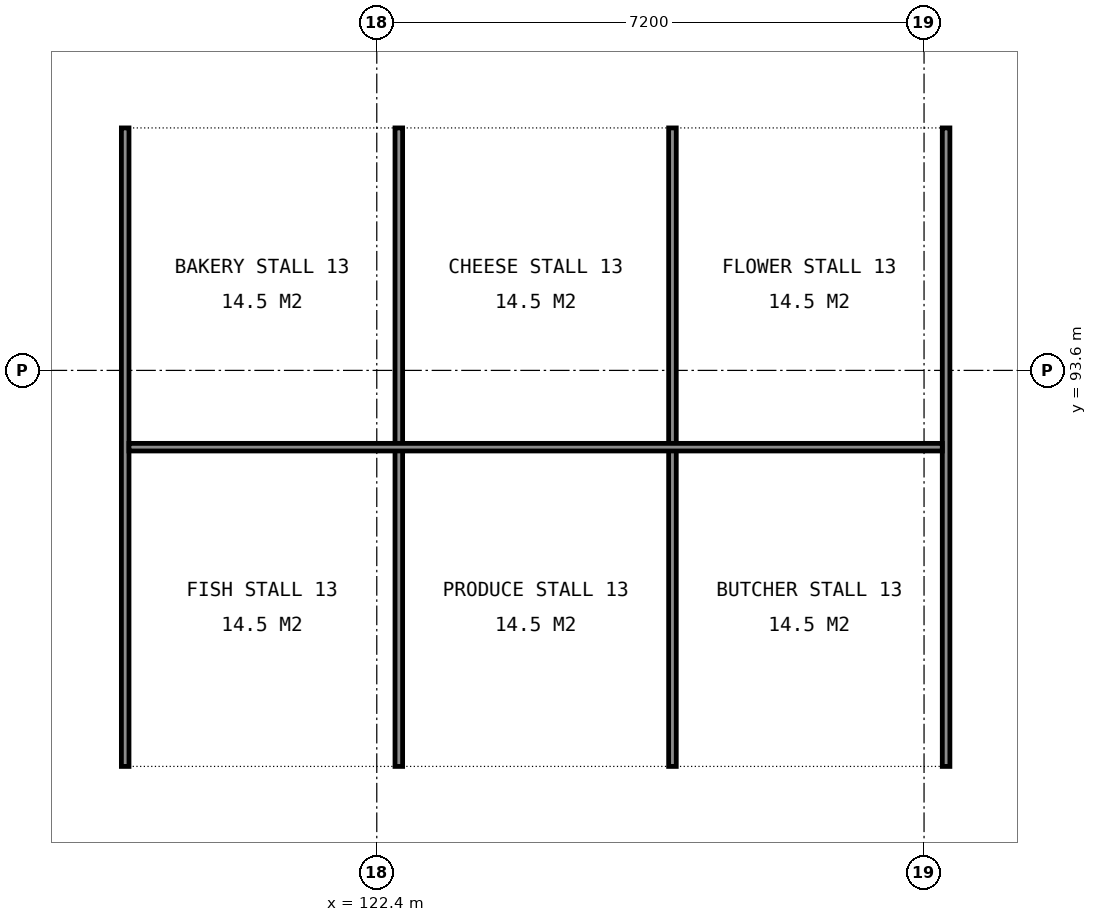
"""IFC4 building model, lengths in metres.
Left out: names, types, materials, properties, quantities, classifications, styles, units other than length and angle.
Written with IfcOpenShell. Run it as: python <this file> out.ifc"""

import sys

from ifc_helpers import new_model, si_unit, direction, frame, frame_2d, origin, place, context, subcontext, project, spatial, rectangle, extrude, element, save


model = new_model("IFC4")
c1 = context("Model", 3, precision=1e-05, world=origin(), true_north=direction((0.0, 1.0)))
c2 = subcontext(c1, "Body", "Model", "MODEL_VIEW")
j1 = project(units=[si_unit("LENGTHUNIT", "METRE"), si_unit("PLANEANGLEUNIT", "RADIAN")], contexts=[c1])
p1 = place(None, origin())
s1 = spatial("IfcSite", under=j1, at=p1, CompositionType="ELEMENT")
p2 = place(p1, origin())
s2 = spatial("IfcBuilding", under=s1, at=p2, CompositionType="ELEMENT")
p3 = place(p2, origin())
s3 = spatial("IfcBuildingStorey", under=s2, at=p3, CompositionType="ELEMENT", Elevation=0.0)
for number, where, z_axis, x_axis in (
    (1, (119.09, 88.39, 0.0), (0.0, 0.0, 1.0), (0.0, 1.0, 0.0)),
    (2, (122.69, 88.39, 0.0), (0.0, 0.0, 1.0), (0.0, 1.0, 0.0)),
    (3, (126.29, 88.39, 0.0), (0.0, 0.0, 1.0), (0.0, 1.0, 0.0)),
    (4, (129.89, 88.39, 0.0), (0.0, 0.0, 1.0), (0.0, 1.0, 0.0)),
):
    element("IfcWall", number, at=place(p3, frame(where, z_axis=z_axis, x_axis=x_axis)), inside=s3, PredefinedType="PARTITIONING", context=c2, shape_type="SweptSolid", body=[
        extrude(rectangle(XDim=8.4, YDim=0.1, at=frame_2d((4.2, 0.0))), origin(), (0.0, 0.0, 1.0), 1.2),
    ])
p4 = place(p3, frame((119.14, 92.59, 0.0), z_axis=(0.0, 0.0, 1.0), x_axis=(1.0, 0.0, 0.0)))
e5 = element("IfcWall", 5, at=p4, inside=s3, PredefinedType="PARTITIONING", context=c2, shape_type="SweptSolid", body=[
    extrude(rectangle(XDim=10.7, YDim=0.1, at=frame_2d((5.35, 0.0))), origin(), (0.0, 0.0, 1.0), 1.2),
])
save(model, sys.argv[1])
